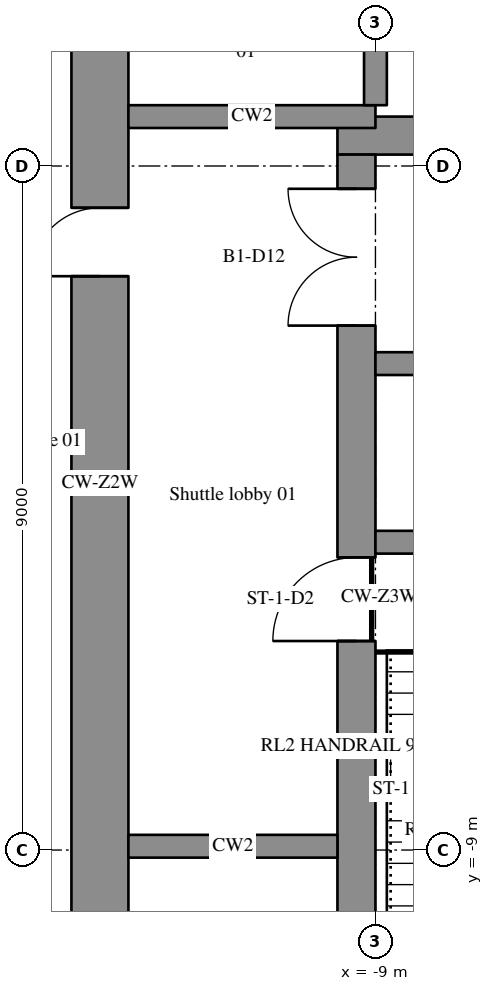
"""IFC4 building model, lengths in metres.
Left out: names, types, materials, properties, quantities, classifications, styles, units other than length and angle.
Written with IfcOpenShell. Run it as: python <this file> out.ifc"""

import sys

from ifc_helpers import new_model, si_unit, direction, frame, frame_2d, origin, place, context, subcontext, project, spatial, rectangle, extrude, element, fill, save


model = new_model("IFC4")
c1 = context("Model", 3, precision=1e-05, world=origin(), true_north=direction((0.0, 1.0)))
c2 = subcontext(c1, "Body", "Model", "MODEL_VIEW")
j1 = project(units=[si_unit("LENGTHUNIT", "METRE"), si_unit("PLANEANGLEUNIT", "RADIAN")], contexts=[c1])
p1 = place(None, origin())
s1 = spatial("IfcSite", under=j1, at=p1, CompositionType="ELEMENT")
p2 = place(p1, origin())
s2 = spatial("IfcBuilding", under=s1, at=p2, CompositionType="ELEMENT")
p3 = place(p2, frame((0.0, 0.0, -5.0)))
s3 = spatial("IfcBuildingStorey", under=s2, at=p3, CompositionType="ELEMENT", Elevation=-5.0)
p4 = place(p3, frame((-12.625, -11.5, -0.25), z_axis=(0.0, 0.0, 1.0), x_axis=(0.0, 1.0, 0.0)))
e1 = element("IfcWall", 1, at=p4, inside=s3, PredefinedType="SHEAR", context=c2, shape_type="SweptSolid", body=[
    extrude(rectangle(XDim=14.65, YDim=0.75, at=frame_2d((7.325, 0.0))), origin(), (0.0, 0.0, 1.0), 5.25),
])
p5 = place(p4, frame((10.05, 0.0, 0.0)))
e2 = element("IfcOpeningElement", 2, at=p5, cuts=e1, PredefinedType="OPENING", context=c2, shape_type="SweptSolid", body=[
    extrude(rectangle(XDim=0.9, YDim=2.1, at=frame_2d((0.45, 1.05))), frame((0.0, 0.385, 0.0), z_axis=(0.0, -1.0, 0.0), x_axis=(1.0, 0.0, 0.0)), (0.0, 0.0, 1.0), 0.77),
])
p6 = place(p3, frame((-9.5, 0.4, -0.25), z_axis=(0.0, 0.0, 1.0), x_axis=(1.0, 0.0, 0.0)))
e3 = element("IfcWall", 3, at=p6, inside=s3, PredefinedType="SHEAR", context=c2, shape_type="SweptSolid", body=[
    extrude(rectangle(XDim=19.0, YDim=0.5, at=frame_2d((9.5, 0.0))), origin(), (0.0, 0.0, 1.0), 5.25),
])
p7 = place(p6, frame((1.4, 0.0, 0.0)))
e4 = element("IfcOpeningElement", 4, at=p7, cuts=e3, PredefinedType="OPENING", context=c2, shape_type="SweptSolid", body=[
    extrude(rectangle(XDim=0.9, YDim=2.1, at=frame_2d((0.45, 1.05))), frame((0.0, 0.26, 0.0), z_axis=(0.0, -1.0, 0.0), x_axis=(1.0, 0.0, 0.0)), (0.0, 0.0, 1.0), 0.52),
])
p8 = place(p6, frame((4.1, 0.0, 0.0)))
e5 = element("IfcOpeningElement", 5, at=p8, cuts=e3, PredefinedType="OPENING", context=c2, shape_type="SweptSolid", body=[
    extrude(rectangle(XDim=0.9, YDim=2.1, at=frame_2d((0.45, 1.05))), frame((0.0, 0.26, 0.0), z_axis=(0.0, -1.0, 0.0), x_axis=(1.0, 0.0, 0.0)), (0.0, 0.0, 1.0), 0.52),
])
p9 = place(p6, frame((6.8, 0.0, 0.0)))
e6 = element("IfcOpeningElement", 6, at=p9, cuts=e3, PredefinedType="OPENING", context=c2, shape_type="SweptSolid", body=[
    extrude(rectangle(XDim=0.9, YDim=2.1, at=frame_2d((0.45, 1.05))), frame((0.0, 0.26, 0.0), z_axis=(0.0, -1.0, 0.0), x_axis=(1.0, 0.0, 0.0)), (0.0, 0.0, 1.0), 0.52),
])
p10 = place(p6, frame((11.3, 0.0, 0.0)))
e7 = element("IfcOpeningElement", 7, at=p10, cuts=e3, PredefinedType="OPENING", context=c2, shape_type="SweptSolid", body=[
    extrude(rectangle(XDim=0.9, YDim=2.1, at=frame_2d((0.45, 1.05))), frame((0.0, 0.26, 0.0), z_axis=(0.0, -1.0, 0.0), x_axis=(1.0, 0.0, 0.0)), (0.0, 0.0, 1.0), 0.52),
])
p11 = place(p6, frame((14.0, 0.0, 0.0)))
e8 = element("IfcOpeningElement", 8, at=p11, cuts=e3, PredefinedType="OPENING", context=c2, shape_type="SweptSolid", body=[
    extrude(rectangle(XDim=0.9, YDim=2.1, at=frame_2d((0.45, 1.05))), frame((0.0, 0.26, 0.0), z_axis=(0.0, -1.0, 0.0), x_axis=(1.0, 0.0, 0.0)), (0.0, 0.0, 1.0), 0.52),
])
p12 = place(p6, frame((16.7, 0.0, 0.0)))
e9 = element("IfcOpeningElement", 9, at=p12, cuts=e3, PredefinedType="OPENING", context=c2, shape_type="SweptSolid", body=[
    extrude(rectangle(XDim=0.9, YDim=2.1, at=frame_2d((0.45, 1.05))), frame((0.0, 0.26, 0.0), z_axis=(0.0, -1.0, 0.0), x_axis=(1.0, 0.0, 0.0)), (0.0, 0.0, 1.0), 0.52),
])
p13 = place(p6, frame((9.05, 0.0, 0.0)))
e10 = element("IfcOpeningElement", 10, at=p13, cuts=e3, PredefinedType="OPENING", context=c2, shape_type="SweptSolid", body=[
    extrude(rectangle(XDim=0.9, YDim=2.1, at=frame_2d((0.45, 1.05))), frame((0.0, 0.26, 0.0), z_axis=(0.0, -1.0, 0.0), x_axis=(1.0, 0.0, 0.0)), (0.0, 0.0, 1.0), 0.52),
])
p14 = place(p3, frame((-9.25, -11.5, -0.25), z_axis=(0.0, 0.0, 1.0), x_axis=(0.0, 1.0, 0.0)))
e11 = element("IfcWall", 11, at=p14, inside=s3, PredefinedType="SHEAR", context=c2, shape_type="SweptSolid", body=[
    extrude(rectangle(XDim=11.65, YDim=0.5, at=frame_2d((5.825, 0.0))), origin(), (0.0, 0.0, 1.0), 5.25),
])
p15 = place(p14, frame((9.4, 0.0, 0.0)))
e12 = element("IfcOpeningElement", 12, at=p15, cuts=e11, PredefinedType="OPENING", context=c2, shape_type="SweptSolid", body=[
    extrude(rectangle(XDim=1.8, YDim=2.1, at=frame_2d((0.9, 1.05))), frame((0.0, 0.26, 0.0), z_axis=(0.0, -1.0, 0.0), x_axis=(1.0, 0.0, 0.0)), (0.0, 0.0, 1.0), 0.52),
])
p16 = place(p14, frame((5.25, 0.0, 0.0)))
e13 = element("IfcOpeningElement", 13, at=p16, cuts=e11, PredefinedType="OPENING", context=c2, shape_type="SweptSolid", body=[
    extrude(rectangle(XDim=1.1, YDim=2.1, at=frame_2d((0.55, 1.05))), frame((0.0, 0.26, 0.0), z_axis=(0.0, -1.0, 0.0), x_axis=(1.0, 0.0, 0.0)), (0.0, 0.0, 1.0), 0.52),
])
p17 = place(p3, frame((-12.25, -8.95, 0.0), z_axis=(0.0, 0.0, 1.0), x_axis=(1.0, 0.0, 0.0)))
e14 = element("IfcWall", 14, at=p17, inside=s3, PredefinedType="SHEAR", context=c2, shape_type="SweptSolid", body=[
    extrude(rectangle(XDim=2.75, YDim=0.3, at=frame_2d((1.375, 0.0))), origin(), (0.0, 0.0, 1.0), 5.0),
])
for number, where, z_axis, x_axis in (
    (15, (-9.0, -4.95, 0.0), (0.0, 0.0, 1.0), (1.0, 0.0, 0.0)),
    (16, (-9.0, -2.6, 0.0), (0.0, 0.0, 1.0), (1.0, 0.0, 0.0)),
):
    element("IfcWall", number, at=place(p3, frame(where, z_axis=z_axis, x_axis=x_axis)), inside=s3, PredefinedType="SHEAR", context=c2, shape_type="SweptSolid", body=[
        extrude(rectangle(XDim=8.1, YDim=0.3, at=frame_2d((4.05, 0.0))), origin(), (0.0, 0.0, 1.0), 5.0),
    ])
p18 = place(p3, frame((-9.0, 0.65, 0.0), z_axis=(0.0, 0.0, 1.0), x_axis=(-1.0, 0.0, 0.0)))
e17 = element("IfcWall", 17, at=p18, inside=s3, PredefinedType="SHEAR", context=c2, shape_type="SweptSolid", body=[
    extrude(rectangle(XDim=3.25, YDim=0.3, at=frame_2d((1.625, 0.0))), origin(), (0.0, 0.0, 1.0), 5.0),
])
p19 = place(p3, frame((-9.0, 0.8, 0.0), z_axis=(0.0, 0.0, 1.0), x_axis=(0.0, 1.0, 0.0)))
e18 = element("IfcWall", 18, at=p19, inside=s3, PredefinedType="SHEAR", context=c2, shape_type="SweptSolid", body=[
    extrude(rectangle(XDim=2.35, YDim=0.3, at=frame_2d((1.175, 0.0))), origin(), (0.0, 0.0, 1.0), 5.0),
])
p20 = place(p15, origin())
e19 = element("IfcDoor", 19, at=p20, inside=s3, OperationType="DOUBLE_DOOR_SINGLE_SWING", PredefinedType="DOOR", context=c2, shape_type="SweptSolid", body=[
    extrude(rectangle(XDim=1.8, YDim=2.1, at=frame_2d((0.9, 1.05))), frame((0.0, 0.025, 0.0), z_axis=(0.0, -1.0, 0.0), x_axis=(1.0, 0.0, 0.0)), (0.0, 0.0, 1.0), 0.05),
])
fill(e12, e19)
p21 = place(p16, origin())
e20 = element("IfcDoor", 20, at=p21, inside=s3, OperationType="SINGLE_SWING_LEFT", PredefinedType="DOOR", context=c2, shape_type="SweptSolid", body=[
    extrude(rectangle(XDim=1.1, YDim=2.1, at=frame_2d((0.55, 1.05))), frame((0.0, 0.025, 0.0), z_axis=(0.0, -1.0, 0.0), x_axis=(1.0, 0.0, 0.0)), (0.0, 0.0, 1.0), 0.05),
])
fill(e13, e20)
p22 = place(p5, origin())
e21 = element("IfcDoor", 21, at=p22, inside=s3, OperationType="SINGLE_SWING_LEFT", PredefinedType="DOOR", context=c2, shape_type="SweptSolid", body=[
    extrude(rectangle(XDim=0.9, YDim=2.1, at=frame_2d((0.45, 1.05))), frame((0.0, 0.025, 0.0), z_axis=(0.0, -1.0, 0.0), x_axis=(1.0, 0.0, 0.0)), (0.0, 0.0, 1.0), 0.05),
])
fill(e2, e21)
save(model, sys.argv[1])
